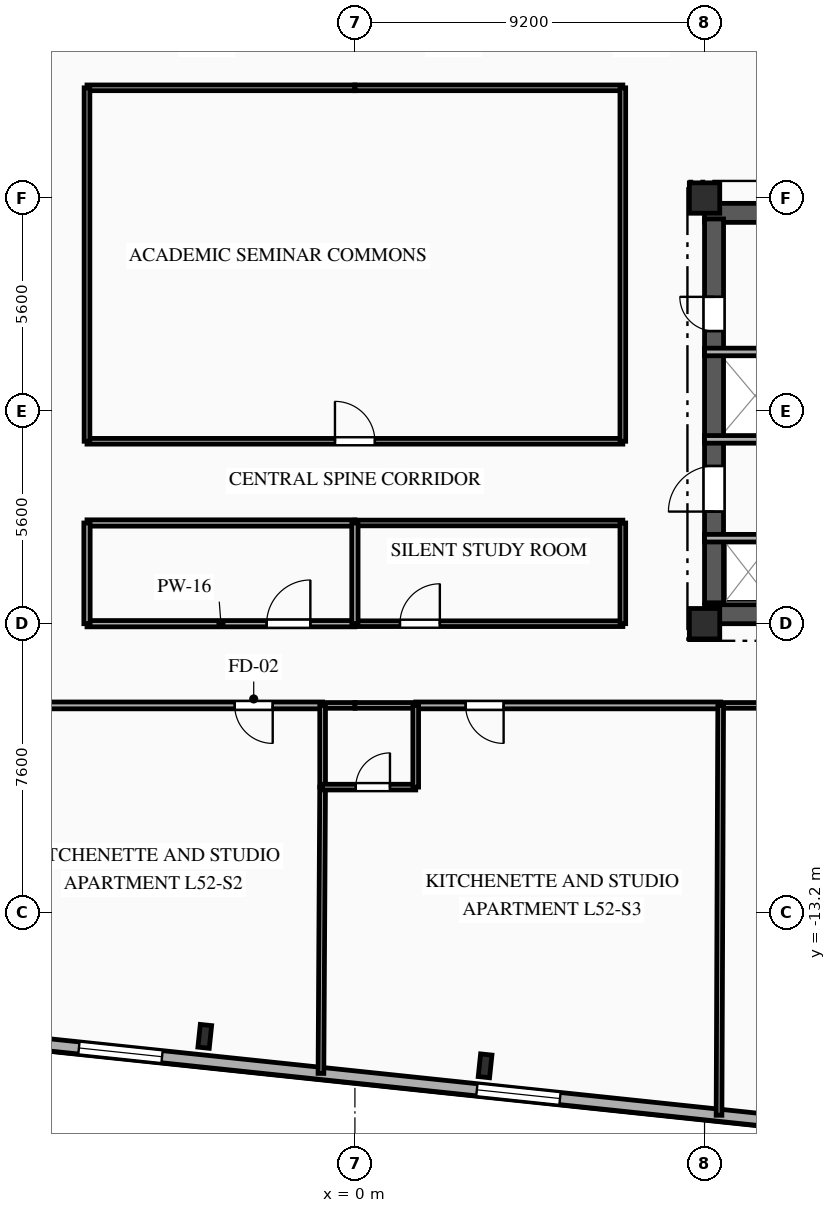
"""IFC4 building model, lengths in metres.
Left out: names, types, materials, properties, quantities, classifications, styles, units other than length and angle.
Written with IfcOpenShell. Run it as: python <this file> out.ifc"""

import sys

from ifc_helpers import new_model, si_unit, direction, frame, frame_2d, origin, origin_2d, place, context, subcontext, project, spatial, rectangle, i_section, extrude, element, fill, save


model = new_model("IFC4")
c1 = context("Model", 3, precision=1e-05, world=origin(), true_north=direction((0.0, 1.0)))
c2 = subcontext(c1, "Body", "Model", "MODEL_VIEW")
j1 = project(units=[si_unit("LENGTHUNIT", "METRE"), si_unit("PLANEANGLEUNIT", "RADIAN")], contexts=[c1])
p1 = place(None, origin())
s1 = spatial("IfcSite", under=j1, at=p1, CompositionType="ELEMENT")
p2 = place(p1, origin())
s2 = spatial("IfcBuilding", under=s1, at=p2, CompositionType="ELEMENT")
p3 = place(p2, frame((0.0, 0.0, 186.35)))
s3 = spatial("IfcBuildingStorey", under=s2, at=p3, CompositionType="ELEMENT", Elevation=186.35)
for number, where, z_axis, x_axis in (
    (1, (9.2, -5.6, 0.0), (0.0, 0.0, 1.0), (1.0, 0.0, 0.0)),
    (2, (9.2, 5.6, 0.0), (0.0, 0.0, 1.0), (1.0, 0.0, 0.0)),
):
    element("IfcColumn", number, at=place(p3, frame(where, z_axis=z_axis, x_axis=x_axis)), inside=s3, PredefinedType="COLUMN", context=c2, shape_type="SweptSolid", body=[
        extrude(rectangle(XDim=0.8, YDim=0.8, at=origin_2d()), origin(), (0.0, 0.0, 1.0), 3.35),
    ])
for number, where, z_axis, x_axis in (
    (3, (-3.951, -16.458, 0.0), (0.0, 0.0, 1.0), (0.995, -0.105, 0.0)),
    (4, (3.425, -17.233, 0.0), (0.0, 0.0, 1.0), (0.995, -0.105, 0.0)),
):
    element("IfcColumn", number, at=place(p3, frame(where, z_axis=z_axis, x_axis=x_axis)), inside=s3, PredefinedType="COLUMN", context=c2, shape_type="SweptSolid", body=[
        extrude(i_section(OverallWidth=0.3, OverallDepth=0.6, WebThickness=0.015, FlangeThickness=0.03, FilletRadius=0.027, at=origin_2d()), origin(), (0.0, 0.0, 1.0), 3.35),
    ])
p4 = place(p3, frame((18.756, -19.498, 0.0), z_axis=(0.0, 0.0, 1.0), x_axis=(-0.994522060044, 0.104526896475, 0.0)))
e5 = element("IfcWall", 5, at=p4, inside=s3, PredefinedType="SOLIDWALL", context=c2, shape_type="SweptSolid", body=[
    extrude(rectangle(XDim=45.8, YDim=0.32, at=frame_2d((22.9, 0.0))), origin(), (0.0, 0.0, 1.0), 3.04),
])
p5 = place(p4, frame((1.217, 0.0, 0.85)))
e6 = element("IfcOpeningElement", 6, at=p5, cuts=e5, PredefinedType="OPENING", context=c2, shape_type="SweptSolid", body=[
    extrude(rectangle(XDim=1.65, YDim=1.85, at=frame_2d((0.825, 0.925))), frame((0.0, 0.17, 0.0), z_axis=(0.0, -1.0, 0.0), x_axis=(1.0, 0.0, 0.0)), (0.0, 0.0, 1.0), 0.34),
])
p6 = place(p4, frame((5.621, 0.0, 0.85)))
e7 = element("IfcOpeningElement", 7, at=p6, cuts=e5, PredefinedType="OPENING", context=c2, shape_type="SweptSolid", body=[
    extrude(rectangle(XDim=1.65, YDim=1.85, at=frame_2d((0.825, 0.925))), frame((0.0, 0.17, 0.0), z_axis=(0.0, -1.0, 0.0), x_axis=(1.0, 0.0, 0.0)), (0.0, 0.0, 1.0), 0.34),
])
p7 = place(p4, frame((13.433, 0.0, 0.85)))
e8 = element("IfcOpeningElement", 8, at=p7, cuts=e5, PredefinedType="OPENING", context=c2, shape_type="SweptSolid", body=[
    extrude(rectangle(XDim=2.2, YDim=1.85, at=frame_2d((1.1, 0.925))), frame((0.0, 0.17, 0.0), z_axis=(0.0, -1.0, 0.0), x_axis=(1.0, 0.0, 0.0)), (0.0, 0.0, 1.0), 0.34),
])
p8 = place(p4, frame((23.962, 0.0, 0.85)))
e9 = element("IfcOpeningElement", 9, at=p8, cuts=e5, PredefinedType="OPENING", context=c2, shape_type="SweptSolid", body=[
    extrude(rectangle(XDim=2.2, YDim=1.85, at=frame_2d((1.1, 0.925))), frame((0.0, 0.17, 0.0), z_axis=(0.0, -1.0, 0.0), x_axis=(1.0, 0.0, 0.0)), (0.0, 0.0, 1.0), 0.34),
])
p9 = place(p4, frame((34.366, 0.0, 0.85)))
e10 = element("IfcOpeningElement", 10, at=p9, cuts=e5, PredefinedType="OPENING", context=c2, shape_type="SweptSolid", body=[
    extrude(rectangle(XDim=1.65, YDim=1.85, at=frame_2d((0.825, 0.925))), frame((0.0, 0.17, 0.0), z_axis=(0.0, -1.0, 0.0), x_axis=(1.0, 0.0, 0.0)), (0.0, 0.0, 1.0), 0.34),
])
p10 = place(p4, frame((41.892, 0.0, 0.85)))
e11 = element("IfcOpeningElement", 11, at=p10, cuts=e5, PredefinedType="OPENING", context=c2, shape_type="SweptSolid", body=[
    extrude(rectangle(XDim=1.65, YDim=1.85, at=frame_2d((0.825, 0.925))), frame((0.0, 0.17, 0.0), z_axis=(0.0, -1.0, 0.0), x_axis=(1.0, 0.0, 0.0)), (0.0, 0.0, 1.0), 0.34),
])
p11 = place(p3, frame((9.2, 5.21, 0.0), z_axis=(0.0, 0.0, 1.0), x_axis=(1.0, 0.0, 0.0)))
e12 = element("IfcWall", 12, at=p11, inside=s3, PredefinedType="SHEAR", context=c2, shape_type="SweptSolid", body=[
    extrude(rectangle(XDim=9.6, YDim=0.5, at=frame_2d((4.8, 0.0))), origin(), (0.0, 0.0, 1.0), 3.04),
])
p12 = place(p11, frame((6.95, 0.0, 0.0)))
e13 = element("IfcOpeningElement", 13, at=p12, cuts=e12, PredefinedType="OPENING", context=c2, shape_type="SweptSolid", body=[
    extrude(rectangle(XDim=1.1, YDim=2.15, at=frame_2d((0.55, 1.075))), frame((0.0, 0.26, 0.0), z_axis=(0.0, -1.0, 0.0), x_axis=(1.0, 0.0, 0.0)), (0.0, 0.0, 1.0), 0.52),
])
p13 = place(p11, frame((3.775, 0.0, 0.0)))
e14 = element("IfcOpeningElement", 14, at=p13, cuts=e12, PredefinedType="OPENING", context=c2, shape_type="SweptSolid", body=[
    extrude(rectangle(XDim=1.05, YDim=2.1, at=frame_2d((0.525, 1.05))), frame((0.0, 0.26, 0.0), z_axis=(0.0, -1.0, 0.0), x_axis=(1.0, 0.0, 0.0)), (0.0, 0.0, 1.0), 0.52),
])
p14 = place(p3, frame((9.2, -5.35, 0.0), z_axis=(0.0, 0.0, 1.0), x_axis=(1.0, 0.0, 0.0)))
e15 = element("IfcWall", 15, at=p14, inside=s3, PredefinedType="SHEAR", context=c2, shape_type="SweptSolid", body=[
    extrude(rectangle(XDim=9.6, YDim=0.5, at=frame_2d((4.8, 0.0))), origin(), (0.0, 0.0, 1.0), 3.04),
])
p15 = place(p14, frame((7.65, 0.0, 0.0)))
e16 = element("IfcOpeningElement", 16, at=p15, cuts=e15, PredefinedType="OPENING", context=c2, shape_type="SweptSolid", body=[
    extrude(rectangle(XDim=0.9, YDim=2.1, at=frame_2d((0.45, 1.05))), frame((0.0, 0.26, 0.0), z_axis=(0.0, -1.0, 0.0), x_axis=(1.0, 0.0, 0.0)), (0.0, 0.0, 1.0), 0.52),
])
p16 = place(p3, frame((9.45, -5.05, 0.0), z_axis=(0.0, 0.0, 1.0), x_axis=(0.0, 1.0, 0.0)))
e17 = element("IfcWall", 17, at=p16, inside=s3, PredefinedType="SHEAR", context=c2, shape_type="SweptSolid", body=[
    extrude(rectangle(XDim=10.1, YDim=0.5, at=frame_2d((5.05, 0.0))), origin(), (0.0, 0.0, 1.0), 3.04),
])
p17 = place(p16, frame((7.15, 0.0, 0.0)))
e18 = element("IfcOpeningElement", 18, at=p17, cuts=e17, PredefinedType="OPENING", context=c2, shape_type="SweptSolid", body=[
    extrude(rectangle(XDim=0.9, YDim=2.1, at=frame_2d((0.45, 1.05))), frame((0.0, 0.26, 0.0), z_axis=(0.0, -1.0, 0.0), x_axis=(1.0, 0.0, 0.0)), (0.0, 0.0, 1.0), 0.52),
])
p18 = place(p16, frame((2.4, 0.0, 0.0)))
e19 = element("IfcOpeningElement", 19, at=p18, cuts=e17, PredefinedType="OPENING", context=c2, shape_type="SweptSolid", body=[
    extrude(rectangle(XDim=1.2, YDim=2.15, at=frame_2d((0.6, 1.075))), frame((0.0, 0.26, 0.0), z_axis=(0.0, -1.0, 0.0), x_axis=(1.0, 0.0, 0.0)), (0.0, 0.0, 1.0), 0.52),
])
p19 = place(p3, frame((9.2, -3.35, 0.0), z_axis=(0.0, 0.0, 1.0), x_axis=(1.0, 0.0, 0.0)))
e20 = element("IfcWall", 20, at=p19, inside=s3, PredefinedType="PARTITIONING", context=c2, shape_type="SweptSolid", body=[
    extrude(rectangle(XDim=1.88, YDim=0.2, at=frame_2d((0.94, 0.0))), origin(), (0.0, 0.0, 1.0), 2.755),
])
p20 = place(p3, frame((11.46, -0.75, 0.0), z_axis=(0.0, 0.0, 1.0), x_axis=(-1.0, 0.0, 0.0)))
e21 = element("IfcWall", 21, at=p20, inside=s3, PredefinedType="PARTITIONING", context=c2, shape_type="SweptSolid", body=[
    extrude(rectangle(XDim=2.26, YDim=0.2, at=frame_2d((1.13, 0.0))), origin(), (0.0, 0.0, 1.0), 3.04),
])
for number, where, z_axis, x_axis in (
    (22, (0.0, 8.5, 0.0), (0.0, 0.0, 1.0), (-1.0, 0.0, 0.0)),
    (23, (7.05, 8.5, 0.0), (0.0, 0.0, 1.0), (-1.0, 0.0, 0.0)),
):
    element("IfcWall", number, at=place(p3, frame(where, z_axis=z_axis, x_axis=x_axis)), inside=s3, PredefinedType="PARTITIONING", context=c2, shape_type="SweptSolid", body=[
        extrude(rectangle(XDim=7.05, YDim=0.15, at=frame_2d((3.525, 0.0))), origin(), (0.0, 0.0, 1.0), 3.04),
    ])
p21 = place(p3, frame((-0.85, -7.75, 0.0), z_axis=(0.0, 0.0, 1.0), x_axis=(-1.0, 0.0, 0.0)))
e24 = element("IfcWall", 24, at=p21, inside=s3, PredefinedType="PARTITIONING", context=c2, shape_type="SweptSolid", body=[
    extrude(rectangle(XDim=8.025, YDim=0.18, at=frame_2d((4.012, 0.0))), origin(), (0.0, 0.0, 1.0), 3.04),
])
p22 = place(p21, frame((1.313, 0.0, 0.0)))
e25 = element("IfcOpeningElement", 25, at=p22, cuts=e24, PredefinedType="OPENING", context=c2, shape_type="SweptSolid", body=[
    extrude(rectangle(XDim=1.0, YDim=2.15, at=frame_2d((0.5, 1.075))), frame((0.0, 0.1, 0.0), z_axis=(0.0, -1.0, 0.0), x_axis=(1.0, 0.0, 0.0)), (0.0, 0.0, 1.0), 0.2),
])
p23 = place(p3, frame((0.0, -7.75, 0.0), z_axis=(0.0, 0.0, 1.0), x_axis=(-1.0, 0.0, 0.0)))
e26 = element("IfcWall", 26, at=p23, inside=s3, PredefinedType="PLUMBINGWALL", context=c2, shape_type="SweptSolid", body=[
    extrude(rectangle(XDim=0.85, YDim=0.15, at=frame_2d((0.425, 0.0))), origin(), (0.0, 0.0, 1.0), 3.04),
])
p24 = place(p3, frame((-7.05, -5.6, 0.0), z_axis=(0.0, 0.0, 1.0), x_axis=(1.0, 0.0, 0.0)))
e27 = element("IfcWall", 27, at=p24, inside=s3, PredefinedType="PARTITIONING", context=c2, shape_type="SweptSolid", body=[
    extrude(rectangle(XDim=7.05, YDim=0.165, at=frame_2d((3.525, 0.0))), origin(), (0.0, 0.0, 1.0), 2.525),
])
p25 = place(p24, frame((4.728, 0.0, 0.0)))
e28 = element("IfcOpeningElement", 28, at=p25, cuts=e27, PredefinedType="OPENING", context=c2, shape_type="SweptSolid", body=[
    extrude(rectangle(XDim=1.15, YDim=2.15, at=frame_2d((0.575, 1.075))), frame((0.0, 0.093, 0.0), z_axis=(0.0, -1.0, 0.0), x_axis=(1.0, 0.0, 0.0)), (0.0, 0.0, 1.0), 0.185),
])
p26 = place(p3, frame((9.625, -7.75, 0.0), z_axis=(0.0, 0.0, 1.0), x_axis=(-1.0, 0.0, 0.0)))
e29 = element("IfcWall", 29, at=p26, inside=s3, PredefinedType="PARTITIONING", context=c2, shape_type="SweptSolid", body=[
    extrude(rectangle(XDim=8.025, YDim=0.18, at=frame_2d((4.012, 0.0))), origin(), (0.0, 0.0, 1.0), 3.04),
])
p27 = place(p26, frame((5.712, 0.0, 0.0)))
e30 = element("IfcOpeningElement", 30, at=p27, cuts=e29, PredefinedType="OPENING", context=c2, shape_type="SweptSolid", body=[
    extrude(rectangle(XDim=1.0, YDim=2.15, at=frame_2d((0.5, 1.075))), frame((0.0, 0.1, 0.0), z_axis=(0.0, -1.0, 0.0), x_axis=(1.0, 0.0, 0.0)), (0.0, 0.0, 1.0), 0.2),
])
p28 = place(p3, frame((1.6, -7.75, 0.0), z_axis=(0.0, 0.0, 1.0), x_axis=(-1.0, 0.0, 0.0)))
e31 = element("IfcWall", 31, at=p28, inside=s3, PredefinedType="PLUMBINGWALL", context=c2, shape_type="SweptSolid", body=[
    extrude(rectangle(XDim=1.6, YDim=0.15, at=frame_2d((0.8, 0.0))), origin(), (0.0, 0.0, 1.0), 3.04),
])
p29 = place(p3, frame((15.288, -7.75, 0.0), z_axis=(0.0, 0.0, 1.0), x_axis=(-1.0, 0.0, 0.0)))
e32 = element("IfcWall", 32, at=p29, inside=s3, PredefinedType="PARTITIONING", context=c2, shape_type="SweptSolid", body=[
    extrude(rectangle(XDim=5.663, YDim=0.15, at=frame_2d((2.831, 0.0))), origin(), (0.0, 0.0, 1.0), 3.04),
])
p30 = place(p29, frame((1.012, 0.0, 0.0)))
e33 = element("IfcOpeningElement", 33, at=p30, cuts=e32, PredefinedType="OPENING", context=c2, shape_type="SweptSolid", body=[
    extrude(rectangle(XDim=1.05, YDim=2.15, at=frame_2d((0.525, 1.075))), frame((0.0, 0.085, 0.0), z_axis=(0.0, -1.0, 0.0), x_axis=(1.0, 0.0, 0.0)), (0.0, 0.0, 1.0), 0.17),
])
p31 = place(p3, frame((0.0, -5.6, 0.0), z_axis=(0.0, 0.0, 1.0), x_axis=(1.0, 0.0, 0.0)))
e34 = element("IfcWall", 34, at=p31, inside=s3, PredefinedType="PARTITIONING", context=c2, shape_type="SweptSolid", body=[
    extrude(rectangle(XDim=7.05, YDim=0.15, at=frame_2d((3.525, 0.0))), origin(), (0.0, 0.0, 1.0), 2.525),
])
p32 = place(p31, frame((1.185, 0.0, 0.0)))
e35 = element("IfcOpeningElement", 35, at=p32, cuts=e34, PredefinedType="OPENING", context=c2, shape_type="SweptSolid", body=[
    extrude(rectangle(XDim=1.05, YDim=2.15, at=frame_2d((0.525, 1.075))), frame((0.0, 0.085, 0.0), z_axis=(0.0, -1.0, 0.0), x_axis=(1.0, 0.0, 0.0)), (0.0, 0.0, 1.0), 0.17),
])
p33 = place(p3, frame((-7.05, -0.8, 0.0), z_axis=(0.0, 0.0, 1.0), x_axis=(1.0, 0.0, 0.0)))
e36 = element("IfcWall", 36, at=p33, inside=s3, PredefinedType="PARTITIONING", context=c2, shape_type="SweptSolid", body=[
    extrude(rectangle(XDim=14.1, YDim=0.15, at=frame_2d((7.05, 0.0))), origin(), (0.0, 0.0, 1.0), 3.04),
])
p34 = place(p33, frame((6.525, 0.0, 0.0)))
e37 = element("IfcOpeningElement", 37, at=p34, cuts=e36, PredefinedType="OPENING", context=c2, shape_type="SweptSolid", body=[
    extrude(rectangle(XDim=1.05, YDim=2.15, at=frame_2d((0.525, 1.075))), frame((0.0, 0.085, 0.0), z_axis=(0.0, -1.0, 0.0), x_axis=(1.0, 0.0, 0.0)), (0.0, 0.0, 1.0), 0.17),
])
p35 = place(p3, frame((0.0, -2.95, 0.0), z_axis=(0.0, 0.0, 1.0), x_axis=(-1.0, 0.0, 0.0)))
e38 = element("IfcWall", 38, at=p35, inside=s3, PredefinedType="PARTITIONING", context=c2, shape_type="SweptSolid", body=[
    extrude(rectangle(XDim=7.05, YDim=0.165, at=frame_2d((3.525, 0.0))), origin(), (0.0, 0.0, 1.0), 3.04),
])
p36 = place(p3, frame((7.05, -2.95, 0.0), z_axis=(0.0, 0.0, 1.0), x_axis=(-1.0, 0.0, 0.0)))
e39 = element("IfcWall", 39, at=p36, inside=s3, PredefinedType="PARTITIONING", context=c2, shape_type="SweptSolid", body=[
    extrude(rectangle(XDim=7.05, YDim=0.15, at=frame_2d((3.525, 0.0))), origin(), (0.0, 0.0, 1.0), 3.04),
])
p37 = place(p3, frame((-7.05, 8.5, 0.0), z_axis=(0.0, 0.0, 1.0), x_axis=(0.0, -1.0, 0.0)))
e40 = element("IfcWall", 40, at=p37, inside=s3, PredefinedType="PARTITIONING", context=c2, shape_type="SweptSolid", body=[
    extrude(rectangle(XDim=9.3, YDim=0.15, at=frame_2d((4.65, 0.0))), origin(), (0.0, 0.0, 1.0), 3.04),
])
p38 = place(p3, frame((-7.05, -2.95, 0.0), z_axis=(0.0, 0.0, 1.0), x_axis=(0.0, -1.0, 0.0)))
e41 = element("IfcWall", 41, at=p38, inside=s3, PredefinedType="PARTITIONING", context=c2, shape_type="SweptSolid", body=[
    extrude(rectangle(XDim=2.65, YDim=0.165, at=frame_2d((1.325, 0.0))), origin(), (0.0, 0.0, 1.0), 3.04),
])
p39 = place(p3, frame((7.05, -0.8, 0.0), z_axis=(0.0, 0.0, 1.0), x_axis=(0.0, 1.0, 0.0)))
e42 = element("IfcWall", 42, at=p39, inside=s3, PredefinedType="PARTITIONING", context=c2, shape_type="SweptSolid", body=[
    extrude(rectangle(XDim=9.3, YDim=0.15, at=frame_2d((4.65, 0.0))), origin(), (0.0, 0.0, 1.0), 3.04),
])
p40 = place(p3, frame((7.05, -5.6, 0.0), z_axis=(0.0, 0.0, 1.0), x_axis=(0.0, 1.0, 0.0)))
e43 = element("IfcWall", 43, at=p40, inside=s3, PredefinedType="PARTITIONING", context=c2, shape_type="SweptSolid", body=[
    extrude(rectangle(XDim=2.65, YDim=0.15, at=frame_2d((1.325, 0.0))), origin(), (0.0, 0.0, 1.0), 3.04),
])
p41 = place(p3, frame((-0.85, -9.9, 0.0), z_axis=(0.0, 0.0, 1.0), x_axis=(-0.005801043172, -0.999983173807, 0.0)))
e44 = element("IfcWall", 44, at=p41, inside=s3, PredefinedType="PARTITIONING", context=c2, shape_type="SweptSolid", body=[
    extrude(rectangle(XDim=7.533, YDim=0.15, at=frame_2d((3.767, 0.0))), origin(), (0.0, 0.0, 1.0), 3.04),
])
p42 = place(p3, frame((-0.85, -7.75, 0.0), z_axis=(0.0, 0.0, 1.0), x_axis=(0.0, -1.0, 0.0)))
e45 = element("IfcWall", 45, at=p42, inside=s3, PredefinedType="PLUMBINGWALL", context=c2, shape_type="SweptSolid", body=[
    extrude(rectangle(XDim=2.15, YDim=0.15, at=frame_2d((1.075, 0.0))), origin(), (0.0, 0.0, 1.0), 3.04),
])
p43 = place(p3, frame((-0.85, -9.9, 0.0), z_axis=(0.0, 0.0, 1.0), x_axis=(1.0, 0.0, 0.0)))
e46 = element("IfcWall", 46, at=p43, inside=s3, PredefinedType="PLUMBINGWALL", context=c2, shape_type="SweptSolid", body=[
    extrude(rectangle(XDim=2.45, YDim=0.15, at=frame_2d((1.225, 0.0))), origin(), (0.0, 0.0, 1.0), 3.04),
])
p44 = place(p43, frame((0.873, 0.0, 0.0)))
e47 = element("IfcOpeningElement", 47, at=p44, cuts=e46, PredefinedType="OPENING", context=c2, shape_type="SweptSolid", body=[
    extrude(rectangle(XDim=0.9, YDim=2.1, at=frame_2d((0.45, 1.05))), frame((0.0, 0.085, 0.0), z_axis=(0.0, -1.0, 0.0), x_axis=(1.0, 0.0, 0.0)), (0.0, 0.0, 1.0), 0.17),
])
p45 = place(p3, frame((1.6, -9.9, 0.0), z_axis=(0.0, 0.0, 1.0), x_axis=(0.0, 1.0, 0.0)))
e48 = element("IfcWall", 48, at=p45, inside=s3, PredefinedType="PLUMBINGWALL", context=c2, shape_type="SweptSolid", body=[
    extrude(rectangle(XDim=2.15, YDim=0.15, at=frame_2d((1.075, 0.0))), origin(), (0.0, 0.0, 1.0), 3.04),
])
p46 = place(p3, frame((9.625, -7.75, 0.0), z_axis=(0.0, 0.0, 1.0), x_axis=(-0.004074945792, -0.999991697374, 0.0)))
e49 = element("IfcWall", 49, at=p46, inside=s3, PredefinedType="PARTITIONING", context=c2, shape_type="SweptSolid", body=[
    extrude(rectangle(XDim=10.784, YDim=0.15, at=frame_2d((5.392, 0.0))), origin(), (0.0, 0.0, 1.0), 3.04),
])
p47 = place(p3, frame((0.0, -2.95, 0.0), z_axis=(0.0, 0.0, 1.0), x_axis=(0.0, -1.0, 0.0)))
e50 = element("IfcWall", 50, at=p47, inside=s3, PredefinedType="PARTITIONING", context=c2, shape_type="SweptSolid", body=[
    extrude(rectangle(XDim=2.65, YDim=0.165, at=frame_2d((1.325, 0.0))), origin(), (0.0, 0.0, 1.0), 3.04),
])
p48 = place(p3, frame((9.2, 1.55, 0.0), z_axis=(0.0, 0.0, 1.0), x_axis=(1.0, 0.0, 0.0)))
e51 = element("IfcWall", 51, at=p48, inside=s3, PredefinedType="PARTITIONING", context=c2, shape_type="SweptSolid", body=[
    extrude(rectangle(XDim=5.82, YDim=0.2, at=frame_2d((2.91, 0.0))), origin(), (0.0, 0.0, 1.0), 3.04),
])
p49 = place(p7, origin())
e52 = element("IfcWindow", 52, at=p49, inside=s3, PartitioningType="SINGLE_PANEL", PredefinedType="WINDOW", context=c2, shape_type="SweptSolid", body=[
    extrude(rectangle(XDim=2.2, YDim=1.85, at=frame_2d((1.1, 0.925))), frame((0.0, 0.03, 0.0), z_axis=(0.0, -1.0, 0.0), x_axis=(1.0, 0.0, 0.0)), (0.0, 0.0, 1.0), 0.06),
])
fill(e8, e52)
p50 = place(p8, origin())
e53 = element("IfcWindow", 53, at=p50, inside=s3, PartitioningType="SINGLE_PANEL", PredefinedType="WINDOW", context=c2, shape_type="SweptSolid", body=[
    extrude(rectangle(XDim=2.2, YDim=1.85, at=frame_2d((1.1, 0.925))), frame((0.0, 0.03, 0.0), z_axis=(0.0, -1.0, 0.0), x_axis=(1.0, 0.0, 0.0)), (0.0, 0.0, 1.0), 0.06),
])
fill(e9, e53)
p51 = place(p17, origin())
e54 = element("IfcDoor", 54, at=p51, inside=s3, OperationType="SINGLE_SWING_RIGHT", PredefinedType="DOOR", context=c2, shape_type="SweptSolid", body=[
    extrude(rectangle(XDim=0.9, YDim=2.1, at=frame_2d((0.45, 1.05))), frame((0.0, 0.025, 0.0), z_axis=(0.0, -1.0, 0.0), x_axis=(1.0, 0.0, 0.0)), (0.0, 0.0, 1.0), 0.05),
])
fill(e18, e54)
p52 = place(p18, origin())
e55 = element("IfcDoor", 55, at=p52, inside=s3, OperationType="SINGLE_SWING_LEFT", PredefinedType="DOOR", context=c2, shape_type="SweptSolid", body=[
    extrude(rectangle(XDim=1.2, YDim=2.15, at=frame_2d((0.6, 1.075))), frame((0.0, 0.025, 0.0), z_axis=(0.0, -1.0, 0.0), x_axis=(1.0, 0.0, 0.0)), (0.0, 0.0, 1.0), 0.05),
])
fill(e19, e55)
p53 = place(p22, origin())
e56 = element("IfcDoor", 56, at=p53, inside=s3, OperationType="SINGLE_SWING_LEFT", PredefinedType="DOOR", context=c2, shape_type="SweptSolid", body=[
    extrude(rectangle(XDim=1.0, YDim=2.15, at=frame_2d((0.5, 1.075))), frame((0.0, 0.025, 0.0), z_axis=(0.0, -1.0, 0.0), x_axis=(1.0, 0.0, 0.0)), (0.0, 0.0, 1.0), 0.05),
])
fill(e25, e56)
p54 = place(p25, origin())
e57 = element("IfcDoor", 57, at=p54, inside=s3, OperationType="SINGLE_SWING_RIGHT", PredefinedType="DOOR", context=c2, shape_type="SweptSolid", body=[
    extrude(rectangle(XDim=1.15, YDim=2.15, at=frame_2d((0.575, 1.075))), frame((0.0, 0.025, 0.0), z_axis=(0.0, -1.0, 0.0), x_axis=(1.0, 0.0, 0.0)), (0.0, 0.0, 1.0), 0.05),
])
fill(e28, e57)
p55 = place(p27, origin())
e58 = element("IfcDoor", 58, at=p55, inside=s3, OperationType="SINGLE_SWING_LEFT", PredefinedType="DOOR", context=c2, shape_type="SweptSolid", body=[
    extrude(rectangle(XDim=1.0, YDim=2.15, at=frame_2d((0.5, 1.075))), frame((0.0, 0.025, 0.0), z_axis=(0.0, -1.0, 0.0), x_axis=(1.0, 0.0, 0.0)), (0.0, 0.0, 1.0), 0.05),
])
fill(e30, e58)
p56 = place(p32, origin())
e59 = element("IfcDoor", 59, at=p56, inside=s3, OperationType="SINGLE_SWING_RIGHT", PredefinedType="DOOR", context=c2, shape_type="SweptSolid", body=[
    extrude(rectangle(XDim=1.05, YDim=2.15, at=frame_2d((0.525, 1.075))), frame((0.0, 0.025, 0.0), z_axis=(0.0, -1.0, 0.0), x_axis=(1.0, 0.0, 0.0)), (0.0, 0.0, 1.0), 0.05),
])
fill(e35, e59)
p57 = place(p34, origin())
e60 = element("IfcDoor", 60, at=p57, inside=s3, OperationType="SINGLE_SWING_LEFT", PredefinedType="DOOR", context=c2, shape_type="SweptSolid", body=[
    extrude(rectangle(XDim=1.05, YDim=2.15, at=frame_2d((0.525, 1.075))), frame((0.0, 0.025, 0.0), z_axis=(0.0, -1.0, 0.0), x_axis=(1.0, 0.0, 0.0)), (0.0, 0.0, 1.0), 0.05),
])
fill(e37, e60)
p58 = place(p44, origin())
e61 = element("IfcDoor", 61, at=p58, inside=s3, OperationType="SINGLE_SWING_RIGHT", PredefinedType="DOOR", context=c2, shape_type="SweptSolid", body=[
    extrude(rectangle(XDim=0.9, YDim=2.1, at=frame_2d((0.45, 1.05))), frame((0.0, 0.025, 0.0), z_axis=(0.0, -1.0, 0.0), x_axis=(1.0, 0.0, 0.0)), (0.0, 0.0, 1.0), 0.05),
])
fill(e47, e61)
save(model, sys.argv[1])
